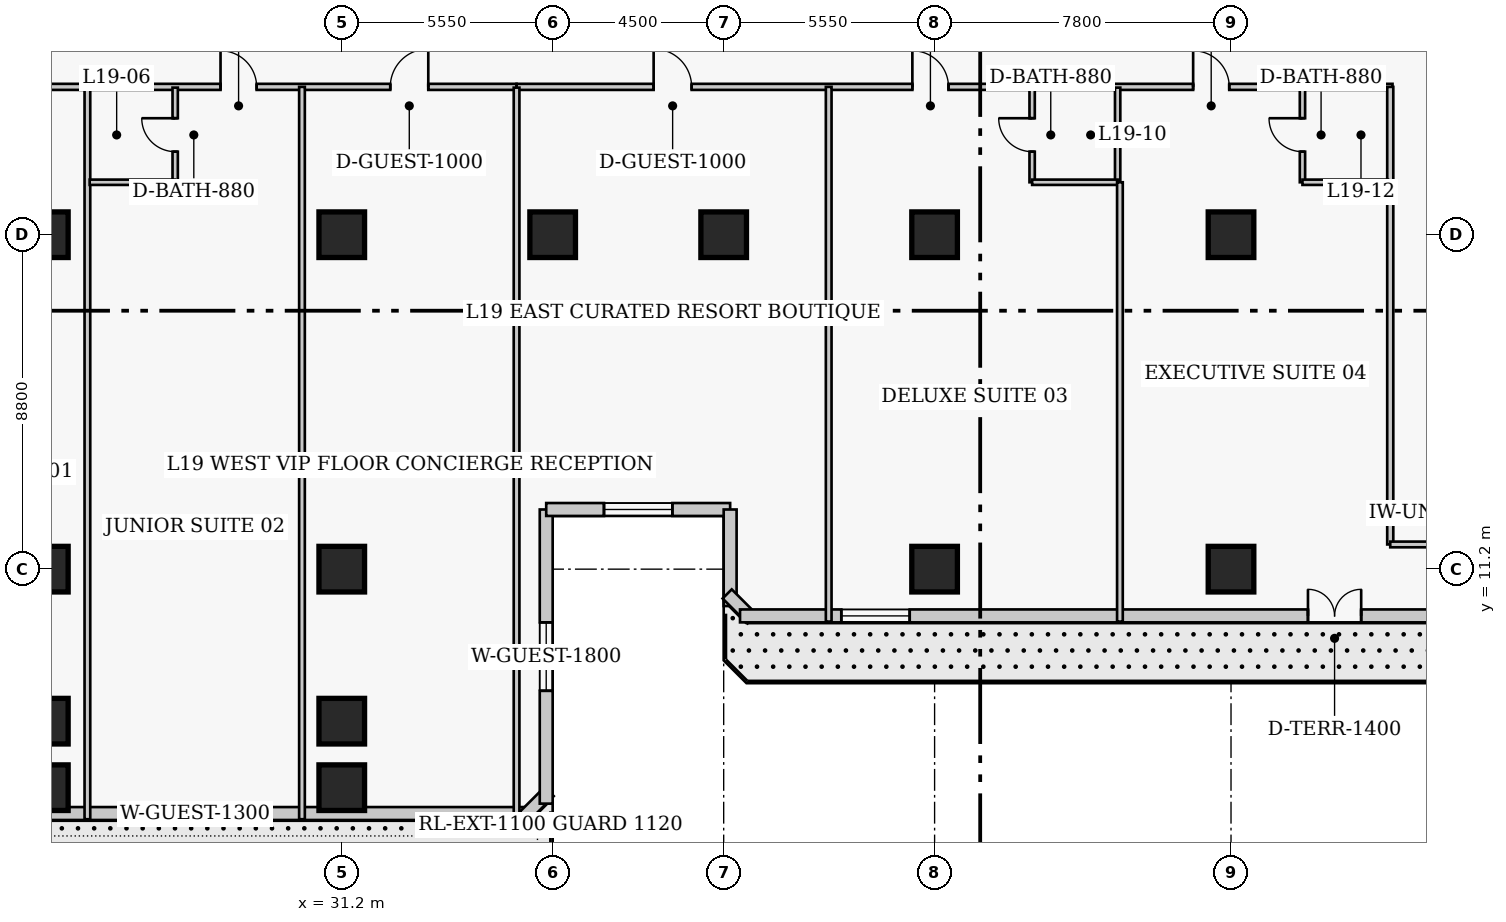
"""IFC4 building model, lengths in metres.
Left out: names, types, materials, properties, quantities, classifications, styles, units other than length and angle.
Written with IfcOpenShell. Run it as: python <this file> out.ifc"""

import sys

from ifc_helpers import new_model, si_unit, direction, frame, frame_2d, origin, origin_2d, place, context, subcontext, project, spatial, rectangle, extrude, element, fill, save


model = new_model("IFC4")
c1 = context("Model", 3, precision=1e-05, world=origin(), true_north=direction((0.0, 1.0)))
c2 = subcontext(c1, "Body", "Model", "MODEL_VIEW")
j1 = project(units=[si_unit("LENGTHUNIT", "METRE"), si_unit("PLANEANGLEUNIT", "RADIAN")], contexts=[c1])
p1 = place(None, origin())
s1 = spatial("IfcSite", under=j1, at=p1, CompositionType="ELEMENT")
p2 = place(p1, origin())
s2 = spatial("IfcBuilding", under=s1, at=p2, CompositionType="ELEMENT")
p3 = place(p2, frame((0.0, 0.0, 80.4)))
s3 = spatial("IfcBuildingStorey", under=s2, at=p3, CompositionType="ELEMENT", Elevation=80.4)
for number, where, z_axis, x_axis in (
    (1, (23.4, 11.2, 0.0), (0.0, 0.0, 1.0), (1.0, 0.0, 0.0)),
    (2, (23.4, 20.0, 0.0), (0.0, 0.0, 1.0), (1.0, 0.0, 0.0)),
    (3, (31.2, 11.2, 0.0), (0.0, 0.0, 1.0), (1.0, 0.0, 0.0)),
    (4, (31.2, 20.0, 0.0), (0.0, 0.0, 1.0), (1.0, 0.0, 0.0)),
    (5, (36.75, 20.0, 0.0), (0.0, 0.0, 1.0), (1.0, 0.0, 0.0)),
    (6, (41.25, 20.0, 0.0), (0.0, 0.0, 1.0), (1.0, 0.0, 0.0)),
    (7, (46.8, 11.2, 0.0), (0.0, 0.0, 1.0), (1.0, 0.0, 0.0)),
    (8, (46.8, 20.0, 0.0), (0.0, 0.0, 1.0), (1.0, 0.0, 0.0)),
    (9, (54.6, 11.2, 0.0), (0.0, 0.0, 1.0), (1.0, 0.0, 0.0)),
    (10, (54.6, 20.0, 0.0), (0.0, 0.0, 1.0), (1.0, 0.0, 0.0)),
    (11, (23.4, 7.2, 0.0), (0.0, 0.0, 1.0), (1.0, 0.0, 0.0)),
    (12, (31.2, 7.2, 0.0), (0.0, 0.0, 1.0), (1.0, 0.0, 0.0)),
    (13, (23.4, 5.45, 0.0), (0.0, 0.0, 1.0), (1.0, 0.0, 0.0)),
    (14, (31.2, 5.45, 0.0), (0.0, 0.0, 1.0), (1.0, 0.0, 0.0)),
):
    element("IfcColumn", number, at=place(p3, frame(where, z_axis=z_axis, x_axis=x_axis)), inside=s3, PredefinedType="COLUMN", context=c2, shape_type="SweptSolid", body=[
        extrude(rectangle(XDim=1.2, YDim=1.2, at=origin_2d()), origin(), (0.0, 0.0, 1.0), 3.8),
    ])
p4 = place(p3, frame((8.03, 4.77, 0.0), z_axis=(0.0, 0.0, 1.0), x_axis=(1.0, 0.0, 0.0)))
e15 = element("IfcWall", 15, at=p4, inside=s3, PredefinedType="SOLIDWALL", context=c2, shape_type="SweptSolid", body=[
    extrude(rectangle(XDim=28.29, YDim=0.34, at=frame_2d((14.145, 0.0))), origin(), (0.0, 0.0, 1.0), 3.54),
])
p5 = place(p4, frame((11.945, 0.0, 0.0)))
e16 = element("IfcOpeningElement", 16, at=p5, cuts=e15, PredefinedType="OPENING", context=c2, shape_type="SweptSolid", body=[
    extrude(rectangle(XDim=1.4, YDim=2.15, at=frame_2d((0.7, 1.075))), frame((0.0, 0.18, 0.0), z_axis=(0.0, -1.0, 0.0), x_axis=(1.0, 0.0, 0.0)), (0.0, 0.0, 1.0), 0.36),
])
p6 = place(p4, frame((18.66, 0.0, 0.85)))
e17 = element("IfcOpeningElement", 17, at=p6, cuts=e15, PredefinedType="OPENING", context=c2, shape_type="SweptSolid", body=[
    extrude(rectangle(XDim=1.3, YDim=1.7, at=frame_2d((0.65, 0.85))), frame((0.0, 0.18, 0.0), z_axis=(0.0, -1.0, 0.0), x_axis=(1.0, 0.0, 0.0)), (0.0, 0.0, 1.0), 0.36),
])
p7 = place(p3, frame((36.001, 4.692, 0.0), z_axis=(0.0, 0.0, 1.0), x_axis=(0.707238225886, 0.706975312048, 0.0)))
e18 = element("IfcWall", 18, at=p7, inside=s3, PredefinedType="SOLIDWALL", context=c2, shape_type="SweptSolid", body=[
    extrude(rectangle(XDim=0.929, YDim=0.34, at=frame_2d((0.464, 0.0))), origin(), (0.0, 0.0, 1.0), 3.54),
])
p8 = place(p3, frame((36.58, 5.03, 0.0), z_axis=(0.0, 0.0, 1.0), x_axis=(0.0, 1.0, 0.0)))
e19 = element("IfcWall", 19, at=p8, inside=s3, PredefinedType="SOLIDWALL", context=c2, shape_type="SweptSolid", body=[
    extrude(rectangle(XDim=7.74, YDim=0.34, at=frame_2d((3.87, 0.0))), origin(), (0.0, 0.0, 1.0), 3.54),
])
p9 = place(p8, frame((2.97, 0.0, 0.85)))
e20 = element("IfcOpeningElement", 20, at=p9, cuts=e19, PredefinedType="OPENING", context=c2, shape_type="SweptSolid", body=[
    extrude(rectangle(XDim=1.8, YDim=1.8, at=frame_2d((0.9, 0.9))), frame((0.0, 0.18, 0.0), z_axis=(0.0, -1.0, 0.0), x_axis=(1.0, 0.0, 0.0)), (0.0, 0.0, 1.0), 0.36),
])
p10 = place(p3, frame((36.58, 12.77, 0.0), z_axis=(0.0, 0.0, 1.0), x_axis=(1.0, 0.0, 0.0)))
e21 = element("IfcWall", 21, at=p10, inside=s3, PredefinedType="SOLIDWALL", context=c2, shape_type="SweptSolid", body=[
    extrude(rectangle(XDim=4.84, YDim=0.34, at=frame_2d((2.42, 0.0))), origin(), (0.0, 0.0, 1.0), 3.54),
])
p11 = place(p10, frame((1.52, 0.0, 0.85)))
e22 = element("IfcOpeningElement", 22, at=p11, cuts=e21, PredefinedType="OPENING", context=c2, shape_type="SweptSolid", body=[
    extrude(rectangle(XDim=1.8, YDim=1.8, at=frame_2d((0.9, 0.9))), frame((0.0, 0.18, 0.0), z_axis=(0.0, -1.0, 0.0), x_axis=(1.0, 0.0, 0.0)), (0.0, 0.0, 1.0), 0.36),
])
p12 = place(p3, frame((41.42, 12.77, 0.0), z_axis=(0.0, 0.0, 1.0), x_axis=(0.0, -1.0, 0.0)))
e23 = element("IfcWall", 23, at=p12, inside=s3, PredefinedType="SOLIDWALL", context=c2, shape_type="SweptSolid", body=[
    extrude(rectangle(XDim=2.54, YDim=0.34, at=frame_2d((1.27, 0.0))), origin(), (0.0, 0.0, 1.0), 3.54),
])
p13 = place(p3, frame((41.342, 10.549, 0.0), z_axis=(0.0, 0.0, 1.0), x_axis=(0.707106781187, -0.707106781187, 0.0)))
e24 = element("IfcWall", 24, at=p13, inside=s3, PredefinedType="SOLIDWALL", context=c2, shape_type="SweptSolid", body=[
    extrude(rectangle(XDim=0.929, YDim=0.34, at=frame_2d((0.464, 0.0))), origin(), (0.0, 0.0, 1.0), 3.54),
])
p14 = place(p3, frame((41.68, 9.97, 0.0), z_axis=(0.0, 0.0, 1.0), x_axis=(1.0, 0.0, 0.0)))
e25 = element("IfcWall", 25, at=p14, inside=s3, PredefinedType="SOLIDWALL", context=c2, shape_type="SweptSolid", body=[
    extrude(rectangle(XDim=28.29, YDim=0.34, at=frame_2d((14.145, 0.0))), origin(), (0.0, 0.0, 1.0), 3.54),
])
p15 = place(p14, frame((14.945, 0.0, 0.0)))
e26 = element("IfcOpeningElement", 26, at=p15, cuts=e25, PredefinedType="OPENING", context=c2, shape_type="SweptSolid", body=[
    extrude(rectangle(XDim=1.4, YDim=2.15, at=frame_2d((0.7, 1.075))), frame((0.0, 0.18, 0.0), z_axis=(0.0, -1.0, 0.0), x_axis=(1.0, 0.0, 0.0)), (0.0, 0.0, 1.0), 0.36),
])
p16 = place(p14, frame((2.665, 0.0, 0.85)))
e27 = element("IfcOpeningElement", 27, at=p16, cuts=e25, PredefinedType="OPENING", context=c2, shape_type="SweptSolid", body=[
    extrude(rectangle(XDim=1.8, YDim=1.8, at=frame_2d((0.9, 0.9))), frame((0.0, 0.18, 0.0), z_axis=(0.0, -1.0, 0.0), x_axis=(1.0, 0.0, 0.0)), (0.0, 0.0, 1.0), 0.36),
])
p17 = place(p3, frame((18.8, 23.89, 0.0), z_axis=(0.0, 0.0, 1.0), x_axis=(1.0, 0.0, 0.0)))
e28 = element("IfcWall", 28, at=p17, inside=s3, PredefinedType="PARTITIONING", context=c2, shape_type="SweptSolid", body=[
    extrude(rectangle(XDim=17.0, YDim=0.16, at=frame_2d((8.5, 0.0))), origin(), (0.0, 0.0, 1.0), 3.54),
])
p18 = place(p17, frame((3.563, 0.0, 0.0)))
e29 = element("IfcOpeningElement", 29, at=p18, cuts=e28, PredefinedType="OPENING", context=c2, shape_type="SweptSolid", body=[
    extrude(rectangle(XDim=0.95, YDim=2.1, at=frame_2d((0.475, 1.05))), frame((0.0, 0.09, 0.0), z_axis=(0.0, -1.0, 0.0), x_axis=(1.0, 0.0, 0.0)), (0.0, 0.0, 1.0), 0.18),
])
p19 = place(p17, frame((9.21, 0.0, 0.0)))
e30 = element("IfcOpeningElement", 30, at=p19, cuts=e28, PredefinedType="OPENING", context=c2, shape_type="SweptSolid", body=[
    extrude(rectangle(XDim=0.95, YDim=2.1, at=frame_2d((0.475, 1.05))), frame((0.0, 0.09, 0.0), z_axis=(0.0, -1.0, 0.0), x_axis=(1.0, 0.0, 0.0)), (0.0, 0.0, 1.0), 0.18),
])
p20 = place(p17, frame((13.677, 0.0, 0.0)))
e31 = element("IfcOpeningElement", 31, at=p20, cuts=e28, PredefinedType="OPENING", context=c2, shape_type="SweptSolid", body=[
    extrude(rectangle(XDim=1.0, YDim=2.15, at=frame_2d((0.5, 1.075))), frame((0.0, 0.09, 0.0), z_axis=(0.0, -1.0, 0.0), x_axis=(1.0, 0.0, 0.0)), (0.0, 0.0, 1.0), 0.18),
])
p21 = place(p3, frame((35.8, 23.89, 0.0), z_axis=(0.0, 0.0, 1.0), x_axis=(1.0, 0.0, 0.0)))
e32 = element("IfcWall", 32, at=p21, inside=s3, PredefinedType="PARTITIONING", context=c2, shape_type="SweptSolid", body=[
    extrude(rectangle(XDim=23.05, YDim=0.16, at=frame_2d((11.525, 0.0))), origin(), (0.0, 0.0, 1.0), 3.54),
])
p22 = place(p21, frame((3.607, 0.0, 0.0)))
e33 = element("IfcOpeningElement", 33, at=p22, cuts=e32, PredefinedType="OPENING", context=c2, shape_type="SweptSolid", body=[
    extrude(rectangle(XDim=1.0, YDim=2.15, at=frame_2d((0.5, 1.075))), frame((0.0, 0.09, 0.0), z_axis=(0.0, -1.0, 0.0), x_axis=(1.0, 0.0, 0.0)), (0.0, 0.0, 1.0), 0.18),
])
p23 = place(p21, frame((10.415, 0.0, 0.0)))
e34 = element("IfcOpeningElement", 34, at=p23, cuts=e32, PredefinedType="OPENING", context=c2, shape_type="SweptSolid", body=[
    extrude(rectangle(XDim=0.95, YDim=2.1, at=frame_2d((0.475, 1.05))), frame((0.0, 0.09, 0.0), z_axis=(0.0, -1.0, 0.0), x_axis=(1.0, 0.0, 0.0)), (0.0, 0.0, 1.0), 0.18),
])
p24 = place(p21, frame((17.803, 0.0, 0.0)))
e35 = element("IfcOpeningElement", 35, at=p24, cuts=e32, PredefinedType="OPENING", context=c2, shape_type="SweptSolid", body=[
    extrude(rectangle(XDim=0.95, YDim=2.1, at=frame_2d((0.475, 1.05))), frame((0.0, 0.09, 0.0), z_axis=(0.0, -1.0, 0.0), x_axis=(1.0, 0.0, 0.0)), (0.0, 0.0, 1.0), 0.18),
])
p25 = place(p3, frame((58.79, 11.85, 0.0), z_axis=(0.0, 0.0, 1.0), x_axis=(0.0, 1.0, 0.0)))
e36 = element("IfcWall", 36, at=p25, inside=s3, PredefinedType="PARTITIONING", context=c2, shape_type="SweptSolid", body=[
    extrude(rectangle(XDim=12.04, YDim=0.16, at=frame_2d((6.02, 0.0))), origin(), (0.0, 0.0, 1.0), 3.54),
])
p26 = place(p3, frame((58.79, 11.85, 0.0), z_axis=(0.0, 0.0, 1.0), x_axis=(1.0, 0.0, 0.0)))
e37 = element("IfcWall", 37, at=p26, inside=s3, PredefinedType="PARTITIONING", context=c2, shape_type="SweptSolid", body=[
    extrude(rectangle(XDim=2.22, YDim=0.15, at=frame_2d((1.11, 0.0))), origin(), (0.0, 0.0, 1.0), 3.54),
])
p27 = place(p3, frame((24.507, 4.62, 0.0), z_axis=(0.0, 0.0, 1.0), x_axis=(0.0, 1.0, 0.0)))
e38 = element("IfcWall", 38, at=p27, inside=s3, PredefinedType="PARTITIONING", context=c2, shape_type="SweptSolid", body=[
    extrude(rectangle(XDim=19.27, YDim=0.15, at=frame_2d((9.635, 0.0))), origin(), (0.0, 0.0, 1.0), 3.54),
])
p28 = place(p3, frame((26.817, 21.38, 0.0), z_axis=(0.0, 0.0, 1.0), x_axis=(0.0, 1.0, 0.0)))
e39 = element("IfcWall", 39, at=p28, inside=s3, PredefinedType="PLUMBINGWALL", context=c2, shape_type="SweptSolid", body=[
    extrude(rectangle(XDim=2.49, YDim=0.14, at=frame_2d((1.245, 0.0))), origin(), (0.0, 0.0, 1.0), 3.54),
])
p29 = place(p28, frame((0.805, 0.0, 0.0)))
e40 = element("IfcOpeningElement", 40, at=p29, cuts=e39, PredefinedType="OPENING", context=c2, shape_type="SweptSolid", body=[
    extrude(rectangle(XDim=0.88, YDim=2.05, at=frame_2d((0.44, 1.025))), frame((0.0, 0.08, 0.0), z_axis=(0.0, -1.0, 0.0), x_axis=(1.0, 0.0, 0.0)), (0.0, 0.0, 1.0), 0.16),
])
p30 = place(p3, frame((24.567, 21.38, 0.0), z_axis=(0.0, 0.0, 1.0), x_axis=(1.0, 0.0, 0.0)))
e41 = element("IfcWall", 41, at=p30, inside=s3, PredefinedType="PLUMBINGWALL", context=c2, shape_type="SweptSolid", body=[
    extrude(rectangle(XDim=2.25, YDim=0.14, at=frame_2d((1.125, 0.0))), origin(), (0.0, 0.0, 1.0), 3.54),
])
p31 = place(p3, frame((30.153, 4.62, 0.0), z_axis=(0.0, 0.0, 1.0), x_axis=(0.0, 1.0, 0.0)))
e42 = element("IfcWall", 42, at=p31, inside=s3, PredefinedType="PARTITIONING", context=c2, shape_type="SweptSolid", body=[
    extrude(rectangle(XDim=19.27, YDim=0.15, at=frame_2d((9.635, 0.0))), origin(), (0.0, 0.0, 1.0), 3.54),
])
p32 = place(p3, frame((35.8, 4.62, 0.0), z_axis=(0.0, 0.0, 1.0), x_axis=(0.0, 1.0, 0.0)))
e43 = element("IfcWall", 43, at=p32, inside=s3, PredefinedType="PARTITIONING", context=c2, shape_type="SweptSolid", body=[
    extrude(rectangle(XDim=19.25, YDim=0.15, at=frame_2d((9.625, 0.0))), origin(), (0.0, 0.0, 1.0), 3.54),
])
p33 = place(p3, frame((44.013, 9.82, 0.0), z_axis=(0.0, 0.0, 1.0), x_axis=(0.0, 1.0, 0.0)))
e44 = element("IfcWall", 44, at=p33, inside=s3, PredefinedType="PARTITIONING", context=c2, shape_type="SweptSolid", body=[
    extrude(rectangle(XDim=14.07, YDim=0.15, at=frame_2d((7.035, 0.0))), origin(), (0.0, 0.0, 1.0), 3.54),
])
p34 = place(p3, frame((49.367, 21.38, 0.0), z_axis=(0.0, 0.0, 1.0), x_axis=(0.0, 1.0, 0.0)))
e45 = element("IfcWall", 45, at=p34, inside=s3, PredefinedType="PLUMBINGWALL", context=c2, shape_type="SweptSolid", body=[
    extrude(rectangle(XDim=2.49, YDim=0.14, at=frame_2d((1.245, 0.0))), origin(), (0.0, 0.0, 1.0), 3.54),
])
p35 = place(p34, frame((0.805, 0.0, 0.0)))
e46 = element("IfcOpeningElement", 46, at=p35, cuts=e45, PredefinedType="OPENING", context=c2, shape_type="SweptSolid", body=[
    extrude(rectangle(XDim=0.88, YDim=2.05, at=frame_2d((0.44, 1.025))), frame((0.0, 0.08, 0.0), z_axis=(0.0, -1.0, 0.0), x_axis=(1.0, 0.0, 0.0)), (0.0, 0.0, 1.0), 0.16),
])
p36 = place(p3, frame((51.617, 21.38, 0.0), z_axis=(0.0, 0.0, 1.0), x_axis=(0.0, 1.0, 0.0)))
e47 = element("IfcWall", 47, at=p36, inside=s3, PredefinedType="PLUMBINGWALL", context=c2, shape_type="SweptSolid", body=[
    extrude(rectangle(XDim=2.49, YDim=0.14, at=frame_2d((1.245, 0.0))), origin(), (0.0, 0.0, 1.0), 3.54),
])
p37 = place(p3, frame((49.367, 21.38, 0.0), z_axis=(0.0, 0.0, 1.0), x_axis=(1.0, 0.0, 0.0)))
e48 = element("IfcWall", 48, at=p37, inside=s3, PredefinedType="PLUMBINGWALL", context=c2, shape_type="SweptSolid", body=[
    extrude(rectangle(XDim=2.25, YDim=0.14, at=frame_2d((1.125, 0.0))), origin(), (0.0, 0.0, 1.0), 3.54),
])
p38 = place(p3, frame((51.677, 9.82, 0.0), z_axis=(0.0, 0.0, 1.0), x_axis=(0.0, 1.0, 0.0)))
e49 = element("IfcWall", 49, at=p38, inside=s3, PredefinedType="PARTITIONING", context=c2, shape_type="SweptSolid", body=[
    extrude(rectangle(XDim=11.56, YDim=0.15, at=frame_2d((5.78, 0.0))), origin(), (0.0, 0.0, 1.0), 3.54),
])
p39 = place(p3, frame((56.48, 21.38, 0.0), z_axis=(0.0, 0.0, 1.0), x_axis=(0.0, 1.0, 0.0)))
e50 = element("IfcWall", 50, at=p39, inside=s3, PredefinedType="PLUMBINGWALL", context=c2, shape_type="SweptSolid", body=[
    extrude(rectangle(XDim=2.49, YDim=0.14, at=frame_2d((1.245, 0.0))), origin(), (0.0, 0.0, 1.0), 3.54),
])
p40 = place(p39, frame((0.805, 0.0, 0.0)))
e51 = element("IfcOpeningElement", 51, at=p40, cuts=e50, PredefinedType="OPENING", context=c2, shape_type="SweptSolid", body=[
    extrude(rectangle(XDim=0.88, YDim=2.05, at=frame_2d((0.44, 1.025))), frame((0.0, 0.08, 0.0), z_axis=(0.0, -1.0, 0.0), x_axis=(1.0, 0.0, 0.0)), (0.0, 0.0, 1.0), 0.16),
])
p41 = place(p3, frame((56.48, 21.38, 0.0), z_axis=(0.0, 0.0, 1.0), x_axis=(1.0, 0.0, 0.0)))
e52 = element("IfcWall", 52, at=p41, inside=s3, PredefinedType="PLUMBINGWALL", context=c2, shape_type="SweptSolid", body=[
    extrude(rectangle(XDim=2.25, YDim=0.14, at=frame_2d((1.125, 0.0))), origin(), (0.0, 0.0, 1.0), 3.54),
])
p42 = place(p9, origin())
e53 = element("IfcWindow", 53, at=p42, inside=s3, PartitioningType="SINGLE_PANEL", PredefinedType="WINDOW", context=c2, shape_type="SweptSolid", body=[
    extrude(rectangle(XDim=1.8, YDim=1.8, at=frame_2d((0.9, 0.9))), frame((0.0, 0.03, 0.0), z_axis=(0.0, -1.0, 0.0), x_axis=(1.0, 0.0, 0.0)), (0.0, 0.0, 1.0), 0.06),
])
fill(e20, e53)
p43 = place(p11, origin())
e54 = element("IfcWindow", 54, at=p43, inside=s3, PartitioningType="SINGLE_PANEL", PredefinedType="WINDOW", context=c2, shape_type="SweptSolid", body=[
    extrude(rectangle(XDim=1.8, YDim=1.8, at=frame_2d((0.9, 0.9))), frame((0.0, 0.03, 0.0), z_axis=(0.0, -1.0, 0.0), x_axis=(1.0, 0.0, 0.0)), (0.0, 0.0, 1.0), 0.06),
])
fill(e22, e54)
p44 = place(p15, origin())
e55 = element("IfcDoor", 55, at=p44, inside=s3, OperationType="DOUBLE_DOOR_SINGLE_SWING", PredefinedType="DOOR", context=c2, shape_type="SweptSolid", body=[
    extrude(rectangle(XDim=1.4, YDim=2.15, at=frame_2d((0.7, 1.075))), frame((0.0, 0.025, 0.0), z_axis=(0.0, -1.0, 0.0), x_axis=(1.0, 0.0, 0.0)), (0.0, 0.0, 1.0), 0.05),
])
fill(e26, e55)
p45 = place(p16, origin())
e56 = element("IfcWindow", 56, at=p45, inside=s3, PartitioningType="SINGLE_PANEL", PredefinedType="WINDOW", context=c2, shape_type="SweptSolid", body=[
    extrude(rectangle(XDim=1.8, YDim=1.8, at=frame_2d((0.9, 0.9))), frame((0.0, 0.03, 0.0), z_axis=(0.0, -1.0, 0.0), x_axis=(1.0, 0.0, 0.0)), (0.0, 0.0, 1.0), 0.06),
])
fill(e27, e56)
p46 = place(p6, origin())
e57 = element("IfcWindow", 57, at=p46, inside=s3, PartitioningType="SINGLE_PANEL", PredefinedType="WINDOW", context=c2, shape_type="SweptSolid", body=[
    extrude(rectangle(XDim=1.3, YDim=1.7, at=frame_2d((0.65, 0.85))), frame((0.0, 0.03, 0.0), z_axis=(0.0, -1.0, 0.0), x_axis=(1.0, 0.0, 0.0)), (0.0, 0.0, 1.0), 0.06),
])
fill(e17, e57)
p47 = place(p29, origin())
e58 = element("IfcDoor", 58, at=p47, inside=s3, OperationType="SINGLE_SWING_RIGHT", PredefinedType="DOOR", context=c2, shape_type="SweptSolid", body=[
    extrude(rectangle(XDim=0.88, YDim=2.05, at=frame_2d((0.44, 1.025))), frame((0.0, 0.025, 0.0), z_axis=(0.0, -1.0, 0.0), x_axis=(1.0, 0.0, 0.0)), (0.0, 0.0, 1.0), 0.05),
])
fill(e40, e58)
p48 = place(p19, origin())
e59 = element("IfcDoor", 59, at=p48, inside=s3, OperationType="SINGLE_SWING_LEFT", PredefinedType="DOOR", context=c2, shape_type="SweptSolid", body=[
    extrude(rectangle(XDim=0.95, YDim=2.1, at=frame_2d((0.475, 1.05))), frame((0.0, 0.025, 0.0), z_axis=(0.0, -1.0, 0.0), x_axis=(1.0, 0.0, 0.0)), (0.0, 0.0, 1.0), 0.05),
])
fill(e30, e59)
p49 = place(p20, origin())
e60 = element("IfcDoor", 60, at=p49, inside=s3, OperationType="SINGLE_SWING_RIGHT", PredefinedType="DOOR", context=c2, shape_type="SweptSolid", body=[
    extrude(rectangle(XDim=1.0, YDim=2.15, at=frame_2d((0.5, 1.075))), frame((0.0, 0.025, 0.0), z_axis=(0.0, -1.0, 0.0), x_axis=(1.0, 0.0, 0.0)), (0.0, 0.0, 1.0), 0.05),
])
fill(e31, e60)
p50 = place(p22, origin())
e61 = element("IfcDoor", 61, at=p50, inside=s3, OperationType="SINGLE_SWING_LEFT", PredefinedType="DOOR", context=c2, shape_type="SweptSolid", body=[
    extrude(rectangle(XDim=1.0, YDim=2.15, at=frame_2d((0.5, 1.075))), frame((0.0, 0.025, 0.0), z_axis=(0.0, -1.0, 0.0), x_axis=(1.0, 0.0, 0.0)), (0.0, 0.0, 1.0), 0.05),
])
fill(e33, e61)
p51 = place(p35, origin())
e62 = element("IfcDoor", 62, at=p51, inside=s3, OperationType="SINGLE_SWING_RIGHT", PredefinedType="DOOR", context=c2, shape_type="SweptSolid", body=[
    extrude(rectangle(XDim=0.88, YDim=2.05, at=frame_2d((0.44, 1.025))), frame((0.0, 0.025, 0.0), z_axis=(0.0, -1.0, 0.0), x_axis=(1.0, 0.0, 0.0)), (0.0, 0.0, 1.0), 0.05),
])
fill(e46, e62)
p52 = place(p23, origin())
e63 = element("IfcDoor", 63, at=p52, inside=s3, OperationType="SINGLE_SWING_LEFT", PredefinedType="DOOR", context=c2, shape_type="SweptSolid", body=[
    extrude(rectangle(XDim=0.95, YDim=2.1, at=frame_2d((0.475, 1.05))), frame((0.0, 0.025, 0.0), z_axis=(0.0, -1.0, 0.0), x_axis=(1.0, 0.0, 0.0)), (0.0, 0.0, 1.0), 0.05),
])
fill(e34, e63)
p53 = place(p40, origin())
e64 = element("IfcDoor", 64, at=p53, inside=s3, OperationType="SINGLE_SWING_RIGHT", PredefinedType="DOOR", context=c2, shape_type="SweptSolid", body=[
    extrude(rectangle(XDim=0.88, YDim=2.05, at=frame_2d((0.44, 1.025))), frame((0.0, 0.025, 0.0), z_axis=(0.0, -1.0, 0.0), x_axis=(1.0, 0.0, 0.0)), (0.0, 0.0, 1.0), 0.05),
])
fill(e51, e64)
p54 = place(p24, origin())
e65 = element("IfcDoor", 65, at=p54, inside=s3, OperationType="SINGLE_SWING_LEFT", PredefinedType="DOOR", context=c2, shape_type="SweptSolid", body=[
    extrude(rectangle(XDim=0.95, YDim=2.1, at=frame_2d((0.475, 1.05))), frame((0.0, 0.025, 0.0), z_axis=(0.0, -1.0, 0.0), x_axis=(1.0, 0.0, 0.0)), (0.0, 0.0, 1.0), 0.05),
])
fill(e35, e65)
save(model, sys.argv[1])
